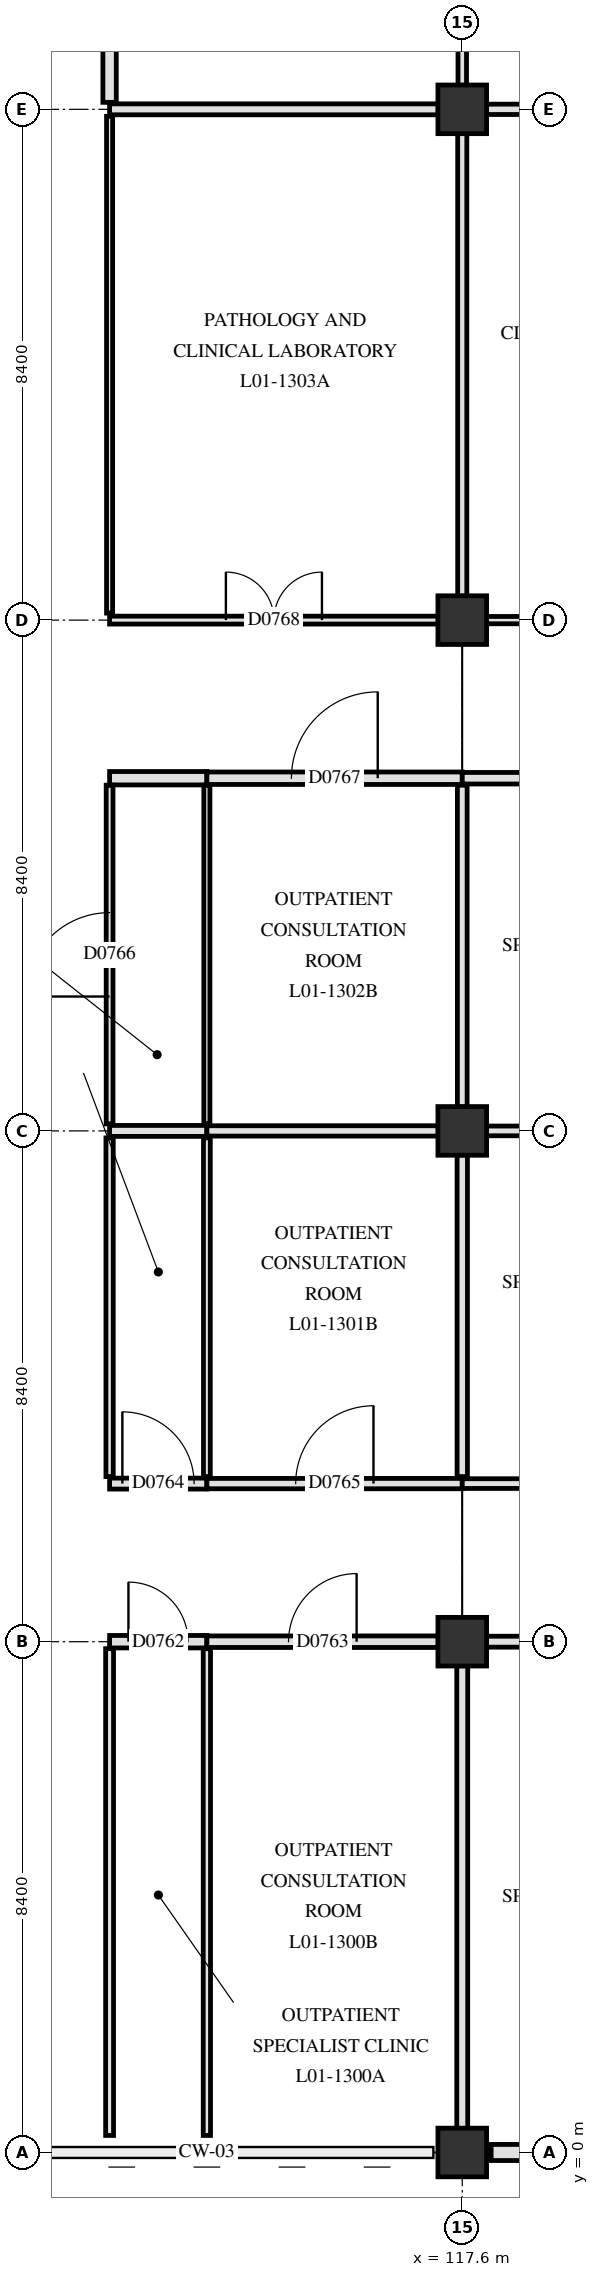
"""IFC4 building model, lengths in metres.
Left out: names, types, materials, properties, quantities, classifications, styles, units other than length and angle.
Written with IfcOpenShell. Run it as: python <this file> out.ifc"""

import sys

from ifc_helpers import new_model, si_unit, direction, frame, frame_2d, origin, origin_2d, place, context, subcontext, project, spatial, rectangle, extrude, element, fill, save


model = new_model("IFC4")
c1 = context("Model", 3, precision=1e-05, world=origin(), true_north=direction((0.0, 1.0)))
c2 = subcontext(c1, "Body", "Model", "MODEL_VIEW")
j1 = project(units=[si_unit("LENGTHUNIT", "METRE"), si_unit("PLANEANGLEUNIT", "RADIAN")], contexts=[c1])
p1 = place(None, origin())
s1 = spatial("IfcSite", under=j1, at=p1, CompositionType="ELEMENT")
p2 = place(p1, origin())
s2 = spatial("IfcBuilding", under=s1, at=p2, CompositionType="ELEMENT")
p3 = place(p2, frame((0.0, 0.0, 4.8)))
s3 = spatial("IfcBuildingStorey", under=s2, at=p3, CompositionType="ELEMENT", Elevation=4.8)
for number, where, z_axis, x_axis in (
    (1, (117.6, 0.0, 0.0), (0.0, 0.0, 1.0), (1.0, 0.0, 0.0)),
    (2, (117.6, 8.4, 0.0), (0.0, 0.0, 1.0), (1.0, 0.0, 0.0)),
    (3, (117.6, 16.8, 0.0), (0.0, 0.0, 1.0), (1.0, 0.0, 0.0)),
    (4, (117.6, 25.2, 0.0), (0.0, 0.0, 1.0), (1.0, 0.0, 0.0)),
    (5, (117.6, 33.6, 0.0), (0.0, 0.0, 1.0), (1.0, 0.0, 0.0)),
):
    element("IfcColumn", number, at=place(p3, frame(where, z_axis=z_axis, x_axis=x_axis)), inside=s3, PredefinedType="COLUMN", context=c2, shape_type="SweptSolid", body=[
        extrude(rectangle(XDim=0.8, YDim=0.8, at=origin_2d()), origin(), (0.0, 0.0, 1.0), 4.5),
    ])
p4 = place(p3, frame((125.525, 0.0, 0.0), z_axis=(0.0, 0.0, 1.0), x_axis=(-1.0, 0.0, 0.0)))
e6 = element("IfcWall", 6, at=p4, inside=s3, PredefinedType="SOLIDWALL", context=c2, shape_type="SweptSolid", body=[
    extrude(rectangle(XDim=7.45, YDim=0.265, at=frame_2d((3.725, 0.0))), origin(), (0.0, 0.0, 1.0), 3.44),
])
p5 = place(p4, frame((0.863, 0.0, 0.85)))
e7 = element("IfcOpeningElement", 7, at=p5, cuts=e6, PredefinedType="OPENING", context=c2, shape_type="SweptSolid", body=[
    extrude(rectangle(XDim=2.0, YDim=1.66, at=frame_2d((1.0, 0.83))), frame((0.0, 0.142, 0.0), z_axis=(0.0, -1.0, 0.0), x_axis=(1.0, 0.0, 0.0)), (0.0, 0.0, 1.0), 0.285),
])
p6 = place(p4, frame((5.012, 0.0, 0.85)))
e8 = element("IfcOpeningElement", 8, at=p6, cuts=e6, PredefinedType="OPENING", context=c2, shape_type="SweptSolid", body=[
    extrude(rectangle(XDim=1.15, YDim=1.78, at=frame_2d((0.575, 0.89))), frame((0.0, 0.142, 0.0), z_axis=(0.0, -1.0, 0.0), x_axis=(1.0, 0.0, 0.0)), (0.0, 0.0, 1.0), 0.285),
])
p7 = place(p3, frame((111.8, 8.4, 0.0), z_axis=(0.0, 0.0, 1.0), x_axis=(1.0, 0.0, 0.0)))
e9 = element("IfcWall", 9, at=p7, inside=s3, PredefinedType="PARTITIONING", context=c2, shape_type="SweptSolid", body=[
    extrude(rectangle(XDim=1.6, YDim=0.205, at=frame_2d((0.8, 0.0))), origin(), (0.0, 0.0, 1.0), 3.54),
])
p8 = place(p7, frame((0.31, 0.0, 0.0)))
e10 = element("IfcOpeningElement", 10, at=p8, cuts=e9, PredefinedType="OPENING", context=c2, shape_type="SweptSolid", body=[
    extrude(rectangle(XDim=0.98, YDim=2.12, at=frame_2d((0.49, 1.06))), frame((0.0, 0.113, 0.0), z_axis=(0.0, -1.0, 0.0), x_axis=(1.0, 0.0, 0.0)), (0.0, 0.0, 1.0), 0.225),
])
p9 = place(p3, frame((113.4, 8.4, 0.0), z_axis=(0.0, 0.0, 1.0), x_axis=(1.0, 0.0, 0.0)))
e11 = element("IfcWall", 11, at=p9, inside=s3, PredefinedType="PARTITIONING", context=c2, shape_type="SweptSolid", body=[
    extrude(rectangle(XDim=3.805, YDim=0.19, at=frame_2d((1.903, 0.0))), origin(), (0.0, 0.0, 1.0), 3.54),
])
p10 = place(p9, frame((1.343, 0.0, 0.0)))
e12 = element("IfcOpeningElement", 12, at=p10, cuts=e11, PredefinedType="OPENING", context=c2, shape_type="SweptSolid", body=[
    extrude(rectangle(XDim=1.12, YDim=2.18, at=frame_2d((0.56, 1.09))), frame((0.0, 0.105, 0.0), z_axis=(0.0, -1.0, 0.0), x_axis=(1.0, 0.0, 0.0)), (0.0, 0.0, 1.0), 0.21),
])
p11 = place(p3, frame((117.995, 8.4, 0.0), z_axis=(0.0, 0.0, 1.0), x_axis=(1.0, 0.0, 0.0)))
e13 = element("IfcWall", 13, at=p11, inside=s3, PredefinedType="PARTITIONING", context=c2, shape_type="SweptSolid", body=[
    extrude(rectangle(XDim=3.805, YDim=0.18, at=frame_2d((1.902, 0.0))), origin(), (0.0, 0.0, 1.0), 3.54),
])
p12 = place(p11, frame((1.427, 0.0, 0.0)))
e14 = element("IfcOpeningElement", 14, at=p12, cuts=e13, PredefinedType="OPENING", context=c2, shape_type="SweptSolid", body=[
    extrude(rectangle(XDim=0.95, YDim=2.1, at=frame_2d((0.475, 1.05))), frame((0.0, 0.1, 0.0), z_axis=(0.0, -1.0, 0.0), x_axis=(1.0, 0.0, 0.0)), (0.0, 0.0, 1.0), 0.2),
])
p13 = place(p3, frame((111.8, 11.0, 0.0), z_axis=(0.0, 0.0, 1.0), x_axis=(1.0, 0.0, 0.0)))
e15 = element("IfcWall", 15, at=p13, inside=s3, PredefinedType="PARTITIONING", context=c2, shape_type="SweptSolid", body=[
    extrude(rectangle(XDim=1.6, YDim=0.18, at=frame_2d((0.8, 0.0))), origin(), (0.0, 0.0, 1.0), 4.14),
])
p14 = place(p13, frame((0.21, 0.0, 0.0)))
e16 = element("IfcOpeningElement", 16, at=p14, cuts=e15, PredefinedType="OPENING", context=c2, shape_type="SweptSolid", body=[
    extrude(rectangle(XDim=1.18, YDim=2.18, at=frame_2d((0.59, 1.09))), frame((0.0, 0.1, 0.0), z_axis=(0.0, -1.0, 0.0), x_axis=(1.0, 0.0, 0.0)), (0.0, 0.0, 1.0), 0.2),
])
p15 = place(p3, frame((113.4, 11.0, 0.0), z_axis=(0.0, 0.0, 1.0), x_axis=(1.0, 0.0, 0.0)))
e17 = element("IfcWall", 17, at=p15, inside=s3, PredefinedType="PARTITIONING", context=c2, shape_type="SweptSolid", body=[
    extrude(rectangle(XDim=4.2, YDim=0.17, at=frame_2d((2.1, 0.0))), origin(), (0.0, 0.0, 1.0), 3.59),
])
p16 = place(p15, frame((1.46, 0.0, 0.0)))
e18 = element("IfcOpeningElement", 18, at=p16, cuts=e17, PredefinedType="OPENING", context=c2, shape_type="SweptSolid", body=[
    extrude(rectangle(XDim=1.28, YDim=2.18, at=frame_2d((0.64, 1.09))), frame((0.0, 0.095, 0.0), z_axis=(0.0, -1.0, 0.0), x_axis=(1.0, 0.0, 0.0)), (0.0, 0.0, 1.0), 0.19),
])
p17 = place(p3, frame((117.6, 11.0, 0.0), z_axis=(0.0, 0.0, 1.0), x_axis=(1.0, 0.0, 0.0)))
e19 = element("IfcWall", 19, at=p17, inside=s3, PredefinedType="PARTITIONING", context=c2, shape_type="SweptSolid", body=[
    extrude(rectangle(XDim=4.2, YDim=0.16, at=frame_2d((2.1, 0.0))), origin(), (0.0, 0.0, 1.0), 3.59),
])
p18 = place(p17, frame((1.525, 0.0, 0.0)))
e20 = element("IfcOpeningElement", 20, at=p18, cuts=e19, PredefinedType="OPENING", context=c2, shape_type="SweptSolid", body=[
    extrude(rectangle(XDim=1.15, YDim=2.15, at=frame_2d((0.575, 1.075))), frame((0.0, 0.09, 0.0), z_axis=(0.0, -1.0, 0.0), x_axis=(1.0, 0.0, 0.0)), (0.0, 0.0, 1.0), 0.18),
])
p19 = place(p3, frame((111.8, 16.8, 0.0), z_axis=(0.0, 0.0, 1.0), x_axis=(1.0, 0.0, 0.0)))
e21 = element("IfcWall", 21, at=p19, inside=s3, PredefinedType="PARTITIONING", context=c2, shape_type="SweptSolid", body=[
    extrude(rectangle(XDim=1.6, YDim=0.18, at=frame_2d((0.8, 0.0))), origin(), (0.0, 0.0, 1.0), 3.54),
])
p20 = place(p3, frame((113.4, 16.8, 0.0), z_axis=(0.0, 0.0, 1.0), x_axis=(1.0, 0.0, 0.0)))
e22 = element("IfcWall", 22, at=p20, inside=s3, PredefinedType="PARTITIONING", context=c2, shape_type="SweptSolid", body=[
    extrude(rectangle(XDim=3.805, YDim=0.17, at=frame_2d((1.903, 0.0))), origin(), (0.0, 0.0, 1.0), 3.54),
])
p21 = place(p3, frame((117.995, 16.8, 0.0), z_axis=(0.0, 0.0, 1.0), x_axis=(1.0, 0.0, 0.0)))
e23 = element("IfcWall", 23, at=p21, inside=s3, PredefinedType="PARTITIONING", context=c2, shape_type="SweptSolid", body=[
    extrude(rectangle(XDim=3.805, YDim=0.16, at=frame_2d((1.902, 0.0))), origin(), (0.0, 0.0, 1.0), 3.54),
])
p22 = place(p3, frame((111.8, 22.6, 0.0), z_axis=(0.0, 0.0, 1.0), x_axis=(1.0, 0.0, 0.0)))
e24 = element("IfcWall", 24, at=p22, inside=s3, PredefinedType="PARTITIONING", context=c2, shape_type="SweptSolid", body=[
    extrude(rectangle(XDim=1.6, YDim=0.22, at=frame_2d((0.8, 0.0))), origin(), (0.0, 0.0, 1.0), 4.14),
])
p23 = place(p3, frame((113.4, 22.6, 0.0), z_axis=(0.0, 0.0, 1.0), x_axis=(1.0, 0.0, 0.0)))
e25 = element("IfcWall", 25, at=p23, inside=s3, PredefinedType="PARTITIONING", context=c2, shape_type="SweptSolid", body=[
    extrude(rectangle(XDim=4.2, YDim=0.205, at=frame_2d((2.1, 0.0))), origin(), (0.0, 0.0, 1.0), 3.59),
])
p24 = place(p23, frame((1.39, 0.0, 0.0)))
e26 = element("IfcOpeningElement", 26, at=p24, cuts=e25, PredefinedType="OPENING", context=c2, shape_type="SweptSolid", body=[
    extrude(rectangle(XDim=1.42, YDim=2.22, at=frame_2d((0.71, 1.11))), frame((0.0, 0.113, 0.0), z_axis=(0.0, -1.0, 0.0), x_axis=(1.0, 0.0, 0.0)), (0.0, 0.0, 1.0), 0.225),
])
p25 = place(p3, frame((117.6, 22.6, 0.0), z_axis=(0.0, 0.0, 1.0), x_axis=(1.0, 0.0, 0.0)))
e27 = element("IfcWall", 27, at=p25, inside=s3, PredefinedType="PARTITIONING", context=c2, shape_type="SweptSolid", body=[
    extrude(rectangle(XDim=4.2, YDim=0.19, at=frame_2d((2.1, 0.0))), origin(), (0.0, 0.0, 1.0), 3.59),
])
p26 = place(p25, frame((1.475, 0.0, 0.0)))
e28 = element("IfcOpeningElement", 28, at=p26, cuts=e27, PredefinedType="OPENING", context=c2, shape_type="SweptSolid", body=[
    extrude(rectangle(XDim=1.25, YDim=2.2, at=frame_2d((0.625, 1.1))), frame((0.0, 0.105, 0.0), z_axis=(0.0, -1.0, 0.0), x_axis=(1.0, 0.0, 0.0)), (0.0, 0.0, 1.0), 0.21),
])
p27 = place(p3, frame((111.8, 25.2, 0.0), z_axis=(0.0, 0.0, 1.0), x_axis=(1.0, 0.0, 0.0)))
e29 = element("IfcWall", 29, at=p27, inside=s3, PredefinedType="PARTITIONING", context=c2, shape_type="SweptSolid", body=[
    extrude(rectangle(XDim=5.405, YDim=0.13, at=frame_2d((2.703, 0.0))), origin(), (0.0, 0.0, 1.0), 3.54),
])
p28 = place(p27, frame((1.913, 0.0, 0.0)))
e30 = element("IfcOpeningElement", 30, at=p28, cuts=e29, PredefinedType="OPENING", context=c2, shape_type="SweptSolid", body=[
    extrude(rectangle(XDim=1.58, YDim=2.22, at=frame_2d((0.79, 1.11))), frame((0.0, 0.075, 0.0), z_axis=(0.0, -1.0, 0.0), x_axis=(1.0, 0.0, 0.0)), (0.0, 0.0, 1.0), 0.15),
])
p29 = place(p3, frame((117.995, 25.2, 0.0), z_axis=(0.0, 0.0, 1.0), x_axis=(1.0, 0.0, 0.0)))
e31 = element("IfcWall", 31, at=p29, inside=s3, PredefinedType="PARTITIONING", context=c2, shape_type="SweptSolid", body=[
    extrude(rectangle(XDim=7.61, YDim=0.12, at=frame_2d((3.805, 0.0))), origin(), (0.0, 0.0, 1.0), 3.54),
])
p30 = place(p29, frame((3.065, 0.0, 0.0)))
e32 = element("IfcOpeningElement", 32, at=p30, cuts=e31, PredefinedType="OPENING", context=c2, shape_type="SweptSolid", body=[
    extrude(rectangle(XDim=1.48, YDim=2.22, at=frame_2d((0.74, 1.11))), frame((0.0, 0.07, 0.0), z_axis=(0.0, -1.0, 0.0), x_axis=(1.0, 0.0, 0.0)), (0.0, 0.0, 1.0), 0.14),
])
p31 = place(p3, frame((111.8, 33.6, 0.0), z_axis=(0.0, 0.0, 1.0), x_axis=(1.0, 0.0, 0.0)))
e33 = element("IfcWall", 33, at=p31, inside=s3, PredefinedType="PARTITIONING", context=c2, shape_type="SweptSolid", body=[
    extrude(rectangle(XDim=5.405, YDim=0.18, at=frame_2d((2.703, 0.0))), origin(), (0.0, 0.0, 1.0), 3.54),
])
p32 = place(p3, frame((117.995, 33.6, 0.0), z_axis=(0.0, 0.0, 1.0), x_axis=(1.0, 0.0, 0.0)))
e34 = element("IfcWall", 34, at=p32, inside=s3, PredefinedType="PARTITIONING", context=c2, shape_type="SweptSolid", body=[
    extrude(rectangle(XDim=7.71, YDim=0.17, at=frame_2d((3.855, 0.0))), origin(), (0.0, 0.0, 1.0), 3.54),
])
p33 = place(p3, frame((111.8, 0.28, 0.0), z_axis=(0.0, 0.0, 1.0), x_axis=(0.0, 1.0, 0.0)))
e35 = element("IfcWall", 35, at=p33, inside=s3, PredefinedType="PARTITIONING", context=c2, shape_type="SweptSolid", body=[
    extrude(rectangle(XDim=8.005, YDim=0.13, at=frame_2d((4.002, 0.0))), origin(), (0.0, 0.0, 1.0), 3.54),
])
p34 = place(p3, frame((111.8, 11.115, 0.0), z_axis=(0.0, 0.0, 1.0), x_axis=(0.0, 1.0, 0.0)))
e36 = element("IfcWall", 36, at=p34, inside=s3, PredefinedType="PARTITIONING", context=c2, shape_type="SweptSolid", body=[
    extrude(rectangle(XDim=5.57, YDim=0.12, at=frame_2d((2.785, 0.0))), origin(), (0.0, 0.0, 1.0), 3.54),
])
p35 = place(p3, frame((111.8, 16.915, 0.0), z_axis=(0.0, 0.0, 1.0), x_axis=(0.0, 1.0, 0.0)))
e37 = element("IfcWall", 37, at=p35, inside=s3, PredefinedType="PARTITIONING", context=c2, shape_type="SweptSolid", body=[
    extrude(rectangle(XDim=5.57, YDim=0.112, at=frame_2d((2.785, 0.0))), origin(), (0.0, 0.0, 1.0), 3.54),
])
p36 = place(p35, frame((2.095, 0.0, 0.0)))
e38 = element("IfcOpeningElement", 38, at=p36, cuts=e37, PredefinedType="OPENING", context=c2, shape_type="SweptSolid", body=[
    extrude(rectangle(XDim=1.38, YDim=2.22, at=frame_2d((0.69, 1.11))), frame((0.0, 0.066, 0.0), z_axis=(0.0, -1.0, 0.0), x_axis=(1.0, 0.0, 0.0)), (0.0, 0.0, 1.0), 0.132),
])
p37 = place(p3, frame((111.8, 25.315, 0.0), z_axis=(0.0, 0.0, 1.0), x_axis=(0.0, 1.0, 0.0)))
e39 = element("IfcWall", 39, at=p37, inside=s3, PredefinedType="PARTITIONING", context=c2, shape_type="SweptSolid", body=[
    extrude(rectangle(XDim=8.17, YDim=0.1, at=frame_2d((4.085, 0.0))), origin(), (0.0, 0.0, 1.0), 3.54),
])
p38 = place(p3, frame((111.8, 33.715, 0.0), z_axis=(0.0, 0.0, 1.0), x_axis=(0.0, 1.0, 0.0)))
e40 = element("IfcWall", 40, at=p38, inside=s3, PredefinedType="PARTITIONING", context=c2, shape_type="SweptSolid", body=[
    extrude(rectangle(XDim=8.17, YDim=0.22, at=frame_2d((4.085, 0.0))), origin(), (0.0, 0.0, 1.0), 3.54),
])
p39 = place(p3, frame((113.4, 0.28, 0.0), z_axis=(0.0, 0.0, 1.0), x_axis=(0.0, 1.0, 0.0)))
e41 = element("IfcWall", 41, at=p39, inside=s3, PredefinedType="PARTITIONING", context=c2, shape_type="SweptSolid", body=[
    extrude(rectangle(XDim=8.005, YDim=0.12, at=frame_2d((4.002, 0.0))), origin(), (0.0, 0.0, 1.0), 3.54),
])
p40 = place(p3, frame((113.4, 11.115, 0.0), z_axis=(0.0, 0.0, 1.0), x_axis=(0.0, 1.0, 0.0)))
e42 = element("IfcWall", 42, at=p40, inside=s3, PredefinedType="PARTITIONING", context=c2, shape_type="SweptSolid", body=[
    extrude(rectangle(XDim=5.57, YDim=0.112, at=frame_2d((2.785, 0.0))), origin(), (0.0, 0.0, 1.0), 3.54),
])
p41 = place(p3, frame((113.4, 16.915, 0.0), z_axis=(0.0, 0.0, 1.0), x_axis=(0.0, 1.0, 0.0)))
e43 = element("IfcWall", 43, at=p41, inside=s3, PredefinedType="PARTITIONING", context=c2, shape_type="SweptSolid", body=[
    extrude(rectangle(XDim=5.57, YDim=0.1, at=frame_2d((2.785, 0.0))), origin(), (0.0, 0.0, 1.0), 3.54),
])
p42 = place(p3, frame((117.6, 0.395, 0.0), z_axis=(0.0, 0.0, 1.0), x_axis=(0.0, 1.0, 0.0)))
e44 = element("IfcWall", 44, at=p42, inside=s3, PredefinedType="PARTITIONING", context=c2, shape_type="SweptSolid", body=[
    extrude(rectangle(XDim=7.61, YDim=0.18, at=frame_2d((3.805, 0.0))), origin(), (0.0, 0.0, 1.0), 3.59),
])
p43 = place(p3, frame((117.6, 11.115, 0.0), z_axis=(0.0, 0.0, 1.0), x_axis=(0.0, 1.0, 0.0)))
e45 = element("IfcWall", 45, at=p43, inside=s3, PredefinedType="PARTITIONING", context=c2, shape_type="SweptSolid", body=[
    extrude(rectangle(XDim=5.29, YDim=0.17, at=frame_2d((2.645, 0.0))), origin(), (0.0, 0.0, 1.0), 3.59),
])
p44 = place(p3, frame((117.6, 17.195, 0.0), z_axis=(0.0, 0.0, 1.0), x_axis=(0.0, 1.0, 0.0)))
e46 = element("IfcWall", 46, at=p44, inside=s3, PredefinedType="PARTITIONING", context=c2, shape_type="SweptSolid", body=[
    extrude(rectangle(XDim=5.29, YDim=0.16, at=frame_2d((2.645, 0.0))), origin(), (0.0, 0.0, 1.0), 3.59),
])
p45 = place(p3, frame((117.6, 25.595, 0.0), z_axis=(0.0, 0.0, 1.0), x_axis=(0.0, 1.0, 0.0)))
e47 = element("IfcWall", 47, at=p45, inside=s3, PredefinedType="PARTITIONING", context=c2, shape_type="SweptSolid", body=[
    extrude(rectangle(XDim=7.61, YDim=0.15, at=frame_2d((3.805, 0.0))), origin(), (0.0, 0.0, 1.0), 3.59),
])
p46 = place(p3, frame((117.6, 33.995, 0.0), z_axis=(0.0, 0.0, 1.0), x_axis=(0.0, 1.0, 0.0)))
e48 = element("IfcWall", 48, at=p46, inside=s3, PredefinedType="PARTITIONING", context=c2, shape_type="SweptSolid", body=[
    extrude(rectangle(XDim=7.61, YDim=0.14, at=frame_2d((3.805, 0.0))), origin(), (0.0, 0.0, 1.0), 3.59),
])
p47 = place(p8, origin())
e49 = element("IfcDoor", 49, at=p47, inside=s3, OperationType="SINGLE_SWING_LEFT", PredefinedType="DOOR", context=c2, shape_type="SweptSolid", body=[
    extrude(rectangle(XDim=0.98, YDim=2.12, at=frame_2d((0.49, 1.06))), frame((0.0, 0.025, 0.0), z_axis=(0.0, -1.0, 0.0), x_axis=(1.0, 0.0, 0.0)), (0.0, 0.0, 1.0), 0.05),
])
fill(e10, e49)
p48 = place(p10, origin())
e50 = element("IfcDoor", 50, at=p48, inside=s3, OperationType="SINGLE_SWING_RIGHT", PredefinedType="DOOR", context=c2, shape_type="SweptSolid", body=[
    extrude(rectangle(XDim=1.12, YDim=2.18, at=frame_2d((0.56, 1.09))), frame((0.0, 0.025, 0.0), z_axis=(0.0, -1.0, 0.0), x_axis=(1.0, 0.0, 0.0)), (0.0, 0.0, 1.0), 0.05),
])
fill(e12, e50)
p49 = place(p14, origin())
e51 = element("IfcDoor", 51, at=p49, inside=s3, OperationType="SINGLE_SWING_LEFT", PredefinedType="DOOR", context=c2, shape_type="SweptSolid", body=[
    extrude(rectangle(XDim=1.18, YDim=2.18, at=frame_2d((0.59, 1.09))), frame((0.0, 0.025, 0.0), z_axis=(0.0, -1.0, 0.0), x_axis=(1.0, 0.0, 0.0)), (0.0, 0.0, 1.0), 0.05),
])
fill(e16, e51)
p50 = place(p16, origin())
e52 = element("IfcDoor", 52, at=p50, inside=s3, OperationType="SINGLE_SWING_RIGHT", PredefinedType="DOOR", context=c2, shape_type="SweptSolid", body=[
    extrude(rectangle(XDim=1.28, YDim=2.18, at=frame_2d((0.64, 1.09))), frame((0.0, 0.025, 0.0), z_axis=(0.0, -1.0, 0.0), x_axis=(1.0, 0.0, 0.0)), (0.0, 0.0, 1.0), 0.05),
])
fill(e18, e52)
p51 = place(p36, origin())
e53 = element("IfcDoor", 53, at=p51, inside=s3, OperationType="SINGLE_SWING_LEFT", PredefinedType="DOOR", context=c2, shape_type="SweptSolid", body=[
    extrude(rectangle(XDim=1.38, YDim=2.22, at=frame_2d((0.69, 1.11))), frame((0.0, 0.025, 0.0), z_axis=(0.0, -1.0, 0.0), x_axis=(1.0, 0.0, 0.0)), (0.0, 0.0, 1.0), 0.05),
])
fill(e38, e53)
p52 = place(p24, origin())
e54 = element("IfcDoor", 54, at=p52, inside=s3, OperationType="SINGLE_SWING_RIGHT", PredefinedType="DOOR", context=c2, shape_type="SweptSolid", body=[
    extrude(rectangle(XDim=1.42, YDim=2.22, at=frame_2d((0.71, 1.11))), frame((0.0, 0.025, 0.0), z_axis=(0.0, -1.0, 0.0), x_axis=(1.0, 0.0, 0.0)), (0.0, 0.0, 1.0), 0.05),
])
fill(e26, e54)
p53 = place(p28, origin())
e55 = element("IfcDoor", 55, at=p53, inside=s3, OperationType="DOUBLE_SWING_LEFT", PredefinedType="DOOR", context=c2, shape_type="SweptSolid", body=[
    extrude(rectangle(XDim=1.58, YDim=2.22, at=frame_2d((0.79, 1.11))), frame((0.0, 0.025, 0.0), z_axis=(0.0, -1.0, 0.0), x_axis=(1.0, 0.0, 0.0)), (0.0, 0.0, 1.0), 0.05),
])
fill(e30, e55)
save(model, sys.argv[1])
